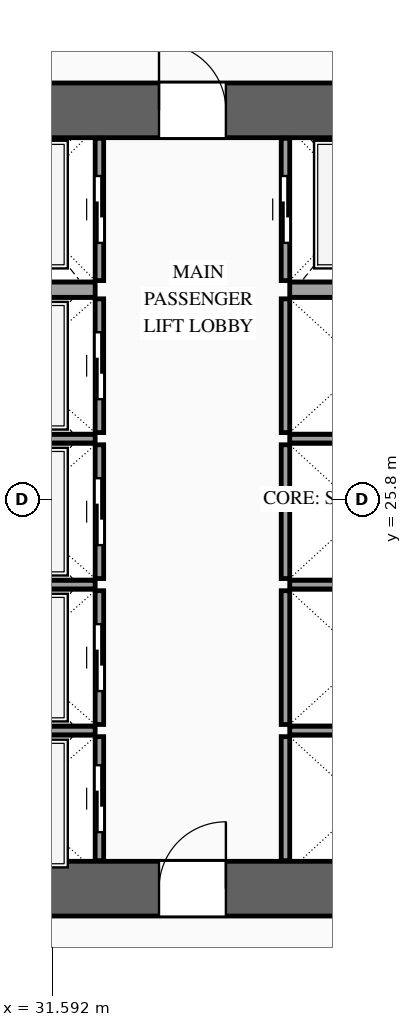
"""IFC4 building model, lengths in metres.
Left out: names, types, materials, properties, quantities, classifications, styles, units other than length and angle.
Written with IfcOpenShell. Run it as: python <this file> out.ifc"""

import sys

from ifc_helpers import new_model, si_unit, direction, frame, frame_2d, origin, place, context, subcontext, project, spatial, rectangle, extrude, source, transform, mapped, element, fill, save


model = new_model("IFC4")
c1 = context("Model", 3, precision=1e-05, world=origin(), true_north=direction((0.0, 1.0)))
c2 = subcontext(c1, "Body", "Model", "MODEL_VIEW")
j1 = project(units=[si_unit("LENGTHUNIT", "METRE"), si_unit("PLANEANGLEUNIT", "RADIAN")], contexts=[c1])
p1 = place(None, origin())
s1 = spatial("IfcSite", under=j1, at=p1, CompositionType="ELEMENT")
p2 = place(p1, origin())
s2 = spatial("IfcBuilding", under=s1, at=p2, CompositionType="ELEMENT")
p3 = place(p2, frame((0.0, 0.0, 37.8)))
s3 = spatial("IfcBuildingStorey", under=s2, at=p3, CompositionType="ELEMENT", Elevation=37.8)
p4 = place(p3, frame((23.35, 19.4, 0.0), z_axis=(0.0, 0.0, 1.0), x_axis=(1.0, 0.0, 0.0)))
e1 = element("IfcWall", 1, at=p4, inside=s3, PredefinedType="SHEAR", context=c2, shape_type="SweptSolid", body=[
    extrude(rectangle(XDim=27.3, YDim=0.9, at=frame_2d((13.65, 0.0))), origin(), (0.0, 0.0, 1.0), 3.6),
])
p5 = place(p4, frame((2.1, 0.0, 0.0)))
e2 = element("IfcOpeningElement", 2, at=p5, cuts=e1, PredefinedType="OPENING", context=c2, shape_type="SweptSolid", body=[
    extrude(rectangle(XDim=1.1, YDim=2.2, at=frame_2d((0.55, 1.1))), frame((0.0, 0.465, 0.0), z_axis=(0.0, -1.0, 0.0), x_axis=(1.0, 0.0, 0.0)), (0.0, 0.0, 1.0), 0.93),
])
p6 = place(p4, frame((10.0, 0.0, 0.0)))
e3 = element("IfcOpeningElement", 3, at=p6, cuts=e1, PredefinedType="OPENING", context=c2, shape_type="SweptSolid", body=[
    extrude(rectangle(XDim=1.1, YDim=2.2, at=frame_2d((0.55, 1.1))), frame((0.0, 0.465, 0.0), z_axis=(0.0, -1.0, 0.0), x_axis=(1.0, 0.0, 0.0)), (0.0, 0.0, 1.0), 0.93),
])
p7 = place(p4, frame((23.2, 0.0, 0.0)))
e4 = element("IfcOpeningElement", 4, at=p7, cuts=e1, PredefinedType="OPENING", context=c2, shape_type="SweptSolid", body=[
    extrude(rectangle(XDim=1.1, YDim=2.2, at=frame_2d((0.55, 1.1))), frame((0.0, 0.465, 0.0), z_axis=(0.0, -1.0, 0.0), x_axis=(1.0, 0.0, 0.0)), (0.0, 0.0, 1.0), 0.93),
])
p8 = place(p4, frame((19.82, 0.0, 0.0)))
e5 = element("IfcOpeningElement", 5, at=p8, cuts=e1, PredefinedType="OPENING", context=c2, shape_type="SweptSolid", body=[
    extrude(rectangle(XDim=0.9, YDim=2.15, at=frame_2d((0.45, 1.075))), frame((0.0, 0.465, 0.0), z_axis=(0.0, -1.0, 0.0), x_axis=(1.0, 0.0, 0.0)), (0.0, 0.0, 1.0), 0.93),
])
p9 = place(p4, frame((18.38, 0.0, 0.0)))
e6 = element("IfcOpeningElement", 6, at=p9, cuts=e1, PredefinedType="OPENING", context=c2, shape_type="SweptSolid", body=[
    extrude(rectangle(XDim=0.9, YDim=2.15, at=frame_2d((0.45, 1.075))), frame((0.0, 0.465, 0.0), z_axis=(0.0, -1.0, 0.0), x_axis=(1.0, 0.0, 0.0)), (0.0, 0.0, 1.0), 0.93),
])
p10 = place(p3, frame((23.35, 32.2, 0.0), z_axis=(0.0, 0.0, 1.0), x_axis=(1.0, 0.0, 0.0)))
e7 = element("IfcWall", 7, at=p10, inside=s3, PredefinedType="SHEAR", context=c2, shape_type="SweptSolid", body=[
    extrude(rectangle(XDim=27.3, YDim=0.9, at=frame_2d((13.65, 0.0))), origin(), (0.0, 0.0, 1.0), 3.6),
])
p11 = place(p10, frame((4.72, 0.0, 0.0)))
e8 = element("IfcOpeningElement", 8, at=p11, cuts=e7, PredefinedType="OPENING", context=c2, shape_type="SweptSolid", body=[
    extrude(rectangle(XDim=0.9, YDim=2.15, at=frame_2d((0.45, 1.075))), frame((0.0, 0.465, 0.0), z_axis=(0.0, -1.0, 0.0), x_axis=(1.0, 0.0, 0.0)), (0.0, 0.0, 1.0), 0.93),
])
p12 = place(p10, frame((10.0, 0.0, 0.0)))
e9 = element("IfcOpeningElement", 9, at=p12, cuts=e7, PredefinedType="OPENING", context=c2, shape_type="SweptSolid", body=[
    extrude(rectangle(XDim=1.1, YDim=2.2, at=frame_2d((0.55, 1.1))), frame((0.0, 0.465, 0.0), z_axis=(0.0, -1.0, 0.0), x_axis=(1.0, 0.0, 0.0)), (0.0, 0.0, 1.0), 0.93),
])
p13 = place(p10, frame((15.85, 0.0, 0.0)))
e10 = element("IfcOpeningElement", 10, at=p13, cuts=e7, PredefinedType="OPENING", context=c2, shape_type="SweptSolid", body=[
    extrude(rectangle(XDim=1.1, YDim=2.2, at=frame_2d((0.55, 1.1))), frame((0.0, 0.465, 0.0), z_axis=(0.0, -1.0, 0.0), x_axis=(1.0, 0.0, 0.0)), (0.0, 0.0, 1.0), 0.93),
])
p14 = place(p3, frame((32.37, 19.86, 0.0), z_axis=(0.0, 0.0, 1.0), x_axis=(0.0, 1.0, 0.0)))
e11 = element("IfcWall", 11, at=p14, inside=s3, PredefinedType="SOLIDWALL", context=c2, shape_type="SweptSolid", body=[
    extrude(rectangle(XDim=2.04, YDim=0.14, at=frame_2d((1.02, 0.0))), origin(), (0.0, 0.0, 1.0), 3.32),
])
p15 = place(p14, frame((0.47, 0.0, 0.0)))
e12 = element("IfcOpeningElement", 12, at=p15, cuts=e11, PredefinedType="OPENING", context=c2, shape_type="SweptSolid", body=[
    extrude(rectangle(XDim=1.1, YDim=2.2, at=frame_2d((0.55, 1.1))), frame((0.0, 0.085, 0.0), z_axis=(0.0, -1.0, 0.0), x_axis=(1.0, 0.0, 0.0)), (0.0, 0.0, 1.0), 0.17),
])
m1 = source(origin(), c2, "Body", "SweptSolid", [
    extrude(rectangle(XDim=2.5, YDim=0.14, at=frame_2d((1.25, 0.0))), origin(), (0.0, 0.0, 1.0), 3.32),
])
p16 = place(p3, frame((29.8, 22.0, 0.0), z_axis=(0.0, 0.0, 1.0), x_axis=(1.0, 0.0, 0.0)))
e13 = element("IfcWall", 13, at=p16, inside=s3, PredefinedType="SOLIDWALL", context=c2, shape_type="MappedRepresentation", body=[
    mapped(m1, transform((0.0, 0.0, 0.0), scale=1.0)),
])
p17 = place(p3, frame((32.37, 22.1, 0.0), z_axis=(0.0, 0.0, 1.0), x_axis=(0.0, 1.0, 0.0)))
e14 = element("IfcWall", 14, at=p17, inside=s3, PredefinedType="SOLIDWALL", context=c2, shape_type="SweptSolid", body=[
    extrude(rectangle(XDim=2.2, YDim=0.14, at=frame_2d((1.1, 0.0))), origin(), (0.0, 0.0, 1.0), 3.32),
])
p18 = place(p17, frame((0.55, 0.0, 0.0)))
e15 = element("IfcOpeningElement", 15, at=p18, cuts=e14, PredefinedType="OPENING", context=c2, shape_type="SweptSolid", body=[
    extrude(rectangle(XDim=1.1, YDim=2.2, at=frame_2d((0.55, 1.1))), frame((0.0, 0.085, 0.0), z_axis=(0.0, -1.0, 0.0), x_axis=(1.0, 0.0, 0.0)), (0.0, 0.0, 1.0), 0.17),
])
p19 = place(p3, frame((29.8, 24.4, 0.0), z_axis=(0.0, 0.0, 1.0), x_axis=(1.0, 0.0, 0.0)))
e16 = element("IfcWall", 16, at=p19, inside=s3, PredefinedType="SOLIDWALL", context=c2, shape_type="MappedRepresentation", body=[
    mapped(m1, transform((0.0, 0.0, 0.0), scale=1.0)),
])
p20 = place(p3, frame((32.37, 24.5, 0.0), z_axis=(0.0, 0.0, 1.0), x_axis=(0.0, 1.0, 0.0)))
e17 = element("IfcWall", 17, at=p20, inside=s3, PredefinedType="SOLIDWALL", context=c2, shape_type="SweptSolid", body=[
    extrude(rectangle(XDim=2.2, YDim=0.14, at=frame_2d((1.1, 0.0))), origin(), (0.0, 0.0, 1.0), 3.32),
])
p21 = place(p20, frame((0.55, 0.0, 0.0)))
e18 = element("IfcOpeningElement", 18, at=p21, cuts=e17, PredefinedType="OPENING", context=c2, shape_type="SweptSolid", body=[
    extrude(rectangle(XDim=1.1, YDim=2.2, at=frame_2d((0.55, 1.1))), frame((0.0, 0.085, 0.0), z_axis=(0.0, -1.0, 0.0), x_axis=(1.0, 0.0, 0.0)), (0.0, 0.0, 1.0), 0.17),
])
p22 = place(p3, frame((29.8, 26.8, 0.0), z_axis=(0.0, 0.0, 1.0), x_axis=(1.0, 0.0, 0.0)))
e19 = element("IfcWall", 19, at=p22, inside=s3, PredefinedType="SOLIDWALL", context=c2, shape_type="MappedRepresentation", body=[
    mapped(m1, transform((0.0, 0.0, 0.0), scale=1.0)),
])
p23 = place(p3, frame((32.37, 26.9, 0.0), z_axis=(0.0, 0.0, 1.0), x_axis=(0.0, 1.0, 0.0)))
e20 = element("IfcWall", 20, at=p23, inside=s3, PredefinedType="SOLIDWALL", context=c2, shape_type="SweptSolid", body=[
    extrude(rectangle(XDim=2.2, YDim=0.14, at=frame_2d((1.1, 0.0))), origin(), (0.0, 0.0, 1.0), 3.32),
])
p24 = place(p23, frame((0.55, 0.0, 0.0)))
e21 = element("IfcOpeningElement", 21, at=p24, cuts=e20, PredefinedType="OPENING", context=c2, shape_type="SweptSolid", body=[
    extrude(rectangle(XDim=1.1, YDim=2.2, at=frame_2d((0.55, 1.1))), frame((0.0, 0.085, 0.0), z_axis=(0.0, -1.0, 0.0), x_axis=(1.0, 0.0, 0.0)), (0.0, 0.0, 1.0), 0.17),
])
p25 = place(p3, frame((32.37, 29.4, 0.0), z_axis=(0.0, 0.0, 1.0), x_axis=(0.0, 1.0, 0.0)))
e22 = element("IfcWall", 22, at=p25, inside=s3, PredefinedType="SOLIDWALL", context=c2, shape_type="SweptSolid", body=[
    extrude(rectangle(XDim=2.34, YDim=0.14, at=frame_2d((1.17, 0.0))), origin(), (0.0, 0.0, 1.0), 3.32),
])
p26 = place(p25, frame((0.62, 0.0, 0.0)))
e23 = element("IfcOpeningElement", 23, at=p26, cuts=e22, PredefinedType="OPENING", context=c2, shape_type="SweptSolid", body=[
    extrude(rectangle(XDim=1.1, YDim=2.2, at=frame_2d((0.55, 1.1))), frame((0.0, 0.085, 0.0), z_axis=(0.0, -1.0, 0.0), x_axis=(1.0, 0.0, 0.0)), (0.0, 0.0, 1.0), 0.17),
])
m2 = source(origin(), c2, "Body", "SweptSolid", [
    extrude(rectangle(XDim=2.5, YDim=0.25, at=frame_2d((1.25, 0.0))), origin(), (0.0, 0.0, 1.0), 3.32),
])
p27 = place(p3, frame((29.8, 29.25, 0.0), z_axis=(0.0, 0.0, 1.0), x_axis=(1.0, 0.0, 0.0)))
e24 = element("IfcWall", 24, at=p27, inside=s3, PredefinedType="SOLIDWALL", context=c2, shape_type="MappedRepresentation", body=[
    mapped(m2, transform((0.0, 0.0, 0.0), scale=1.0)),
])
m3 = source(origin(), c2, "Body", "SweptSolid", [
    extrude(rectangle(XDim=2.04, YDim=0.14, at=frame_2d((1.02, 0.0))), origin(), (0.0, 0.0, 1.0), 3.32),
])
p28 = place(p3, frame((35.43, 19.86, 0.0), z_axis=(0.0, 0.0, 1.0), x_axis=(0.0, 1.0, 0.0)))
e25 = element("IfcWall", 25, at=p28, inside=s3, PredefinedType="SOLIDWALL", context=c2, shape_type="MappedRepresentation", body=[
    mapped(m3, transform((0.0, 0.0, 0.0), scale=1.0)),
])
m4 = source(origin(), c2, "Body", "SweptSolid", [
    extrude(rectangle(XDim=2.4, YDim=0.14, at=frame_2d((1.2, 0.0))), origin(), (0.0, 0.0, 1.0), 3.32),
])
p29 = place(p3, frame((35.5, 22.0, 0.0), z_axis=(0.0, 0.0, 1.0), x_axis=(1.0, 0.0, 0.0)))
e26 = element("IfcWall", 26, at=p29, inside=s3, PredefinedType="SOLIDWALL", context=c2, shape_type="MappedRepresentation", body=[
    mapped(m4, transform((0.0, 0.0, 0.0), scale=1.0)),
])
m5 = source(origin(), c2, "Body", "SweptSolid", [
    extrude(rectangle(XDim=2.2, YDim=0.14, at=frame_2d((1.1, 0.0))), origin(), (0.0, 0.0, 1.0), 3.32),
])
p30 = place(p3, frame((35.43, 22.1, 0.0), z_axis=(0.0, 0.0, 1.0), x_axis=(0.0, 1.0, 0.0)))
e27 = element("IfcWall", 27, at=p30, inside=s3, PredefinedType="SOLIDWALL", context=c2, shape_type="MappedRepresentation", body=[
    mapped(m5, transform((0.0, 0.0, 0.0), scale=1.0)),
])
p31 = place(p3, frame((35.5, 24.4, 0.0), z_axis=(0.0, 0.0, 1.0), x_axis=(1.0, 0.0, 0.0)))
e28 = element("IfcWall", 28, at=p31, inside=s3, PredefinedType="SOLIDWALL", context=c2, shape_type="MappedRepresentation", body=[
    mapped(m4, transform((0.0, 0.0, 0.0), scale=1.0)),
])
p32 = place(p3, frame((35.43, 24.5, 0.0), z_axis=(0.0, 0.0, 1.0), x_axis=(0.0, 1.0, 0.0)))
e29 = element("IfcWall", 29, at=p32, inside=s3, PredefinedType="SOLIDWALL", context=c2, shape_type="MappedRepresentation", body=[
    mapped(m5, transform((0.0, 0.0, 0.0), scale=1.0)),
])
p33 = place(p3, frame((35.5, 26.8, 0.0), z_axis=(0.0, 0.0, 1.0), x_axis=(1.0, 0.0, 0.0)))
e30 = element("IfcWall", 30, at=p33, inside=s3, PredefinedType="SOLIDWALL", context=c2, shape_type="MappedRepresentation", body=[
    mapped(m4, transform((0.0, 0.0, 0.0), scale=1.0)),
])
m6 = source(origin(), c2, "Body", "SweptSolid", [
    extrude(rectangle(XDim=2.2, YDim=0.14, at=frame_2d((1.1, 0.0))), origin(), (0.0, 0.0, 1.0), 3.32),
])
p34 = place(p3, frame((35.43, 26.9, 0.0), z_axis=(0.0, 0.0, 1.0), x_axis=(0.0, 1.0, 0.0)))
e31 = element("IfcWall", 31, at=p34, inside=s3, PredefinedType="SOLIDWALL", context=c2, shape_type="MappedRepresentation", body=[
    mapped(m6, transform((0.0, 0.0, 0.0), scale=1.0)),
])
p35 = place(p3, frame((35.43, 29.4, 0.0), z_axis=(0.0, 0.0, 1.0), x_axis=(0.0, 1.0, 0.0)))
e32 = element("IfcWall", 32, at=p35, inside=s3, PredefinedType="SOLIDWALL", context=c2, shape_type="SweptSolid", body=[
    extrude(rectangle(XDim=2.34, YDim=0.14, at=frame_2d((1.17, 0.0))), origin(), (0.0, 0.0, 1.0), 3.32),
])
p36 = place(p35, frame((0.62, 0.0, 0.0)))
e33 = element("IfcOpeningElement", 33, at=p36, cuts=e32, PredefinedType="OPENING", context=c2, shape_type="SweptSolid", body=[
    extrude(rectangle(XDim=1.1, YDim=2.2, at=frame_2d((0.55, 1.1))), frame((0.0, 0.085, 0.0), z_axis=(0.0, -1.0, 0.0), x_axis=(1.0, 0.0, 0.0)), (0.0, 0.0, 1.0), 0.17),
])
m7 = source(origin(), c2, "Body", "SweptSolid", [
    extrude(rectangle(XDim=2.4, YDim=0.25, at=frame_2d((1.2, 0.0))), origin(), (0.0, 0.0, 1.0), 3.32),
])
p37 = place(p3, frame((35.5, 29.25, 0.0), z_axis=(0.0, 0.0, 1.0), x_axis=(1.0, 0.0, 0.0)))
e34 = element("IfcWall", 34, at=p37, inside=s3, PredefinedType="SOLIDWALL", context=c2, shape_type="MappedRepresentation", body=[
    mapped(m7, transform((0.0, 0.0, 0.0), scale=1.0)),
])
m8 = source(origin(), c2, "Body", "SweptSolid", [
    extrude(rectangle(XDim=1.1, YDim=2.2, at=frame_2d((0.55, 1.1))), frame((0.0, 0.025, 0.0), z_axis=(0.0, -1.0, 0.0), x_axis=(1.0, 0.0, 0.0)), (0.0, 0.0, 1.0), 0.05),
])
p38 = place(p15, origin())
e35 = element("IfcDoor", 35, at=p38, inside=s3, OperationType="SLIDING_TO_LEFT", PredefinedType="DOOR", context=c2, shape_type="MappedRepresentation", body=[
    mapped(m8, transform((0.0, 0.0, 0.0), scale=1.0)),
])
fill(e12, e35)
p39 = place(p18, origin())
e36 = element("IfcDoor", 36, at=p39, inside=s3, OperationType="SLIDING_TO_RIGHT", PredefinedType="DOOR", context=c2, shape_type="MappedRepresentation", body=[
    mapped(m8, transform((0.0, 0.0, 0.0), scale=1.0)),
])
fill(e15, e36)
p40 = place(p21, origin())
e37 = element("IfcDoor", 37, at=p40, inside=s3, OperationType="SLIDING_TO_LEFT", PredefinedType="DOOR", context=c2, shape_type="MappedRepresentation", body=[
    mapped(m8, transform((0.0, 0.0, 0.0), scale=1.0)),
])
fill(e18, e37)
p41 = place(p24, origin())
e38 = element("IfcDoor", 38, at=p41, inside=s3, OperationType="SLIDING_TO_RIGHT", PredefinedType="DOOR", context=c2, shape_type="MappedRepresentation", body=[
    mapped(m8, transform((0.0, 0.0, 0.0), scale=1.0)),
])
fill(e21, e38)
p42 = place(p26, origin())
e39 = element("IfcDoor", 39, at=p42, inside=s3, OperationType="SLIDING_TO_LEFT", PredefinedType="DOOR", context=c2, shape_type="MappedRepresentation", body=[
    mapped(m8, transform((0.0, 0.0, 0.0), scale=1.0)),
])
fill(e23, e39)
p43 = place(p36, origin())
e40 = element("IfcDoor", 40, at=p43, inside=s3, OperationType="SLIDING_TO_RIGHT", PredefinedType="DOOR", context=c2, shape_type="MappedRepresentation", body=[
    mapped(m8, transform((0.0, 0.0, 0.0), scale=1.0)),
])
fill(e33, e40)
m9 = source(origin(), c2, "Body", "SweptSolid", [
    extrude(rectangle(XDim=1.1, YDim=2.2, at=frame_2d((0.55, 1.1))), frame((0.0, 0.025, 0.0), z_axis=(0.0, -1.0, 0.0), x_axis=(1.0, 0.0, 0.0)), (0.0, 0.0, 1.0), 0.05),
])
p44 = place(p6, origin())
e41 = element("IfcDoor", 41, at=p44, inside=s3, OperationType="SINGLE_SWING_RIGHT", PredefinedType="DOOR", context=c2, shape_type="MappedRepresentation", body=[
    mapped(m9, transform((0.0, 0.0, 0.0), scale=1.0)),
])
fill(e3, e41)
p45 = place(p12, origin())
e42 = element("IfcDoor", 42, at=p45, inside=s3, OperationType="SINGLE_SWING_LEFT", PredefinedType="DOOR", context=c2, shape_type="MappedRepresentation", body=[
    mapped(m9, transform((0.0, 0.0, 0.0), scale=1.0)),
])
fill(e9, e42)
save(model, sys.argv[1])
